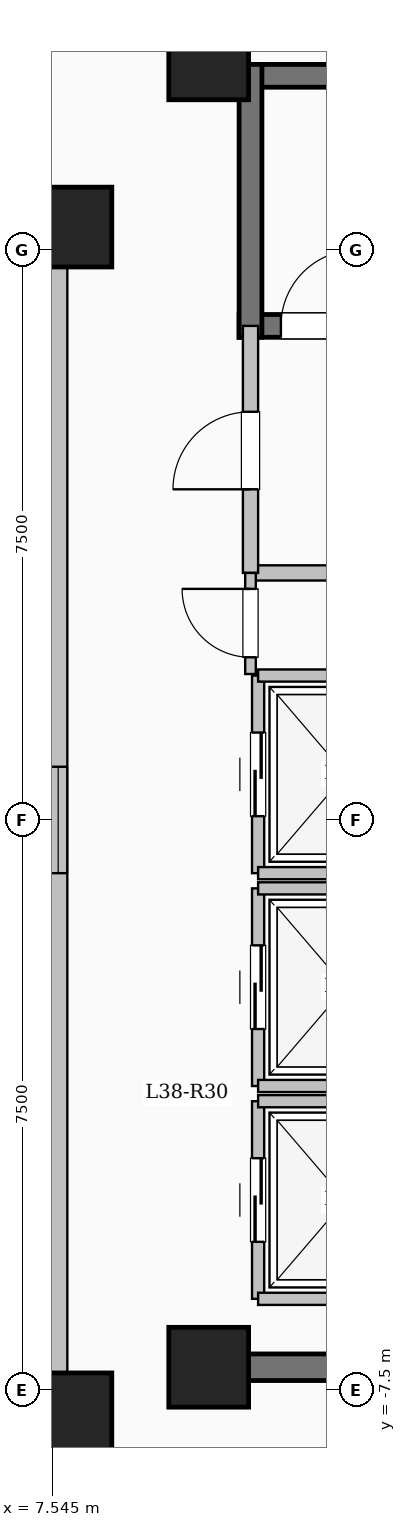
"""IFC4 building model, lengths in metres.
Left out: names, types, materials, properties, quantities, classifications, styles, units other than length and angle.
Written with IfcOpenShell. Run it as: python <this file> out.ifc"""

import sys

from ifc_helpers import new_model, si_unit, direction, frame, frame_2d, origin, origin_2d, place, context, subcontext, project, spatial, rectangle, extrude, element, fill, save


model = new_model("IFC4")
c1 = context("Model", 3, precision=1e-05, world=origin(), true_north=direction((0.0, 1.0)))
c2 = subcontext(c1, "Body", "Model", "MODEL_VIEW")
j1 = project(units=[si_unit("LENGTHUNIT", "METRE"), si_unit("PLANEANGLEUNIT", "RADIAN")], contexts=[c1])
p1 = place(None, origin())
s1 = spatial("IfcSite", under=j1, at=p1, CompositionType="ELEMENT")
p2 = place(p1, origin())
s2 = spatial("IfcBuilding", under=s1, at=p2, CompositionType="ELEMENT")
p3 = place(p2, frame((0.0, 0.0, 142.65)))
s3 = spatial("IfcBuildingStorey", under=s2, at=p3, CompositionType="ELEMENT", Elevation=142.65)
for number, where, z_axis, x_axis in (
    (1, (7.8, -7.8, 0.0), (0.0, 0.0, 1.0), (1.0, 0.0, 0.0)),
    (2, (7.8, 7.8, 0.0), (0.0, 0.0, 1.0), (1.0, 0.0, 0.0)),
    (3, (9.6, -7.2, 0.0), (0.0, 0.0, 1.0), (1.0, 0.0, 0.0)),
    (4, (9.6, 10.0, 0.0), (0.0, 0.0, 1.0), (1.0, 0.0, 0.0)),
):
    element("IfcColumn", number, at=place(p3, frame(where, z_axis=z_axis, x_axis=x_axis)), inside=s3, PredefinedType="COLUMN", context=c2, shape_type="SweptSolid", body=[
        extrude(rectangle(XDim=1.05, YDim=1.05, at=origin_2d()), origin(), (0.0, 0.0, 1.0), 3.35),
    ])
p4 = place(p3, frame((-7.62, -7.62, 0.0), z_axis=(0.0, 0.0, 1.0), x_axis=(1.0, 0.0, 0.0)))
e5 = element("IfcWall", 5, at=p4, inside=s3, PredefinedType="SOLIDWALL", context=c2, shape_type="SweptSolid", body=[
    extrude(rectangle(XDim=15.24, YDim=0.24, at=frame_2d((7.62, 0.0))), origin(), (0.0, 0.0, 1.0), 3.1),
])
p5 = place(p4, frame((6.92, 0.0, 0.95)))
e6 = element("IfcOpeningElement", 6, at=p5, cuts=e5, PredefinedType="OPENING", context=c2, shape_type="SweptSolid", body=[
    extrude(rectangle(XDim=1.4, YDim=1.5, at=frame_2d((0.7, 0.75))), frame((0.0, 0.13, 0.0), z_axis=(0.0, -1.0, 0.0), x_axis=(1.0, 0.0, 0.0)), (0.0, 0.0, 1.0), 0.26),
])
p6 = place(p3, frame((7.62, -7.62, 0.0), z_axis=(0.0, 0.0, 1.0), x_axis=(0.0, 1.0, 0.0)))
e7 = element("IfcWall", 7, at=p6, inside=s3, PredefinedType="SOLIDWALL", context=c2, shape_type="SweptSolid", body=[
    extrude(rectangle(XDim=15.24, YDim=0.24, at=frame_2d((7.62, 0.0))), origin(), (0.0, 0.0, 1.0), 3.1),
])
p7 = place(p6, frame((6.92, 0.0, 0.95)))
e8 = element("IfcOpeningElement", 8, at=p7, cuts=e7, PredefinedType="OPENING", context=c2, shape_type="SweptSolid", body=[
    extrude(rectangle(XDim=1.4, YDim=1.5, at=frame_2d((0.7, 0.75))), frame((0.0, 0.13, 0.0), z_axis=(0.0, -1.0, 0.0), x_axis=(1.0, 0.0, 0.0)), (0.0, 0.0, 1.0), 0.26),
])
p8 = place(p3, frame((7.62, 7.62, 0.0), z_axis=(0.0, 0.0, 1.0), x_axis=(-1.0, 0.0, 0.0)))
e9 = element("IfcWall", 9, at=p8, inside=s3, PredefinedType="SOLIDWALL", context=c2, shape_type="SweptSolid", body=[
    extrude(rectangle(XDim=15.24, YDim=0.24, at=frame_2d((7.62, 0.0))), origin(), (0.0, 0.0, 1.0), 3.1),
])
p9 = place(p8, frame((6.92, 0.0, 0.95)))
e10 = element("IfcOpeningElement", 10, at=p9, cuts=e9, PredefinedType="OPENING", context=c2, shape_type="SweptSolid", body=[
    extrude(rectangle(XDim=1.4, YDim=1.5, at=frame_2d((0.7, 0.75))), frame((0.0, 0.13, 0.0), z_axis=(0.0, -1.0, 0.0), x_axis=(1.0, 0.0, 0.0)), (0.0, 0.0, 1.0), 0.26),
])
p10 = place(p3, frame((10.0, 9.79, 0.0), z_axis=(0.0, 0.0, 1.0), x_axis=(1.0, 0.0, 0.0)))
e11 = element("IfcWall", 11, at=p10, inside=s3, PredefinedType="SHEAR", context=c2, shape_type="SweptSolid", body=[
    extrude(rectangle(XDim=8.0, YDim=0.3, at=frame_2d((4.0, 0.0))), origin(), (0.0, 0.0, 1.0), 3.35),
])
p11 = place(p3, frame((10.0, 6.5, 0.0), z_axis=(0.0, 0.0, 1.0), x_axis=(1.0, 0.0, 0.0)))
e12 = element("IfcWall", 12, at=p11, inside=s3, PredefinedType="SHEAR", context=c2, shape_type="SweptSolid", body=[
    extrude(rectangle(XDim=8.0, YDim=0.3, at=frame_2d((4.0, 0.0))), origin(), (0.0, 0.0, 1.0), 3.35),
])
p12 = place(p11, frame((0.55, 0.0, 0.0)))
e13 = element("IfcOpeningElement", 13, at=p12, cuts=e12, PredefinedType="OPENING", context=c2, shape_type="SweptSolid", body=[
    extrude(rectangle(XDim=1.0, YDim=2.15, at=frame_2d((0.5, 1.075))), frame((0.0, 0.16, 0.0), z_axis=(0.0, -1.0, 0.0), x_axis=(1.0, 0.0, 0.0)), (0.0, 0.0, 1.0), 0.32),
])
p13 = place(p3, frame((10.15, 6.35, 0.0), z_axis=(0.0, 0.0, 1.0), x_axis=(0.0, 1.0, 0.0)))
e14 = element("IfcWall", 14, at=p13, inside=s3, PredefinedType="SHEAR", context=c2, shape_type="SweptSolid", body=[
    extrude(rectangle(XDim=3.59, YDim=0.3, at=frame_2d((1.795, 0.0))), origin(), (0.0, 0.0, 1.0), 3.35),
])
p14 = place(p3, frame((10.15, 3.25, 0.0), z_axis=(0.0, 0.0, 1.0), x_axis=(1.0, 0.0, 0.0)))
e15 = element("IfcWall", 15, at=p14, inside=s3, PredefinedType="SOLIDWALL", context=c2, shape_type="SweptSolid", body=[
    extrude(rectangle(XDim=5.4, YDim=0.2, at=frame_2d((2.7, 0.0))), origin(), (0.0, 0.0, 1.0), 3.1),
])
p15 = place(p3, frame((10.15, 3.25, 0.0), z_axis=(0.0, 0.0, 1.0), x_axis=(0.0, 1.0, 0.0)))
e16 = element("IfcWall", 16, at=p15, inside=s3, PredefinedType="SOLIDWALL", context=c2, shape_type="SweptSolid", body=[
    extrude(rectangle(XDim=3.25, YDim=0.2, at=frame_2d((1.625, 0.0))), origin(), (0.0, 0.0, 1.0), 3.1),
])
p16 = place(p15, frame((1.1, 0.0, 0.0)))
e17 = element("IfcOpeningElement", 17, at=p16, cuts=e16, PredefinedType="OPENING", context=c2, shape_type="SweptSolid", body=[
    extrude(rectangle(XDim=1.02, YDim=2.15, at=frame_2d((0.51, 1.075))), frame((0.0, 0.11, 0.0), z_axis=(0.0, -1.0, 0.0), x_axis=(1.0, 0.0, 0.0)), (0.0, 0.0, 1.0), 0.22),
])
p17 = place(p3, frame((10.25, -6.3, 0.0), z_axis=(0.0, 0.0, 1.0), x_axis=(0.0, 1.0, 0.0)))
e18 = element("IfcWall", 18, at=p17, inside=s3, PredefinedType="SOLIDWALL", context=c2, shape_type="SweptSolid", body=[
    extrude(rectangle(XDim=2.6, YDim=0.16, at=frame_2d((1.3, 0.0))), origin(), (0.0, 0.0, 1.0), 3.1),
])
p18 = place(p17, frame((0.75, 0.0, 0.0)))
e19 = element("IfcOpeningElement", 19, at=p18, cuts=e18, PredefinedType="OPENING", context=c2, shape_type="SweptSolid", body=[
    extrude(rectangle(XDim=1.1, YDim=2.15, at=frame_2d((0.55, 1.075))), frame((0.0, 0.09, 0.0), z_axis=(0.0, -1.0, 0.0), x_axis=(1.0, 0.0, 0.0)), (0.0, 0.0, 1.0), 0.18),
])
for number, where, z_axis, x_axis in (
    (20, (10.25, -6.3, 0.0), (0.0, 0.0, 1.0), (1.0, 0.0, 0.0)),
    (21, (10.25, -3.7, 0.0), (0.0, 0.0, 1.0), (1.0, 0.0, 0.0)),
):
    element("IfcWall", number, at=place(p3, frame(where, z_axis=z_axis, x_axis=x_axis)), inside=s3, PredefinedType="SOLIDWALL", context=c2, shape_type="SweptSolid", body=[
        extrude(rectangle(XDim=2.3, YDim=0.16, at=frame_2d((1.15, 0.0))), origin(), (0.0, 0.0, 1.0), 3.1),
    ])
p19 = place(p3, frame((10.25, -3.5, 0.0), z_axis=(0.0, 0.0, 1.0), x_axis=(0.0, 1.0, 0.0)))
e22 = element("IfcWall", 22, at=p19, inside=s3, PredefinedType="SOLIDWALL", context=c2, shape_type="SweptSolid", body=[
    extrude(rectangle(XDim=2.6, YDim=0.16, at=frame_2d((1.3, 0.0))), origin(), (0.0, 0.0, 1.0), 3.1),
])
p20 = place(p19, frame((0.75, 0.0, 0.0)))
e23 = element("IfcOpeningElement", 23, at=p20, cuts=e22, PredefinedType="OPENING", context=c2, shape_type="SweptSolid", body=[
    extrude(rectangle(XDim=1.1, YDim=2.15, at=frame_2d((0.55, 1.075))), frame((0.0, 0.09, 0.0), z_axis=(0.0, -1.0, 0.0), x_axis=(1.0, 0.0, 0.0)), (0.0, 0.0, 1.0), 0.18),
])
for number, where, z_axis, x_axis in (
    (24, (10.25, -3.5, 0.0), (0.0, 0.0, 1.0), (1.0, 0.0, 0.0)),
    (25, (10.25, -0.9, 0.0), (0.0, 0.0, 1.0), (1.0, 0.0, 0.0)),
):
    element("IfcWall", number, at=place(p3, frame(where, z_axis=z_axis, x_axis=x_axis)), inside=s3, PredefinedType="SOLIDWALL", context=c2, shape_type="SweptSolid", body=[
        extrude(rectangle(XDim=2.3, YDim=0.16, at=frame_2d((1.15, 0.0))), origin(), (0.0, 0.0, 1.0), 3.1),
    ])
p21 = place(p3, frame((10.25, -0.7, 0.0), z_axis=(0.0, 0.0, 1.0), x_axis=(0.0, 1.0, 0.0)))
e26 = element("IfcWall", 26, at=p21, inside=s3, PredefinedType="SOLIDWALL", context=c2, shape_type="SweptSolid", body=[
    extrude(rectangle(XDim=2.6, YDim=0.16, at=frame_2d((1.3, 0.0))), origin(), (0.0, 0.0, 1.0), 3.1),
])
p22 = place(p21, frame((0.75, 0.0, 0.0)))
e27 = element("IfcOpeningElement", 27, at=p22, cuts=e26, PredefinedType="OPENING", context=c2, shape_type="SweptSolid", body=[
    extrude(rectangle(XDim=1.1, YDim=2.15, at=frame_2d((0.55, 1.075))), frame((0.0, 0.09, 0.0), z_axis=(0.0, -1.0, 0.0), x_axis=(1.0, 0.0, 0.0)), (0.0, 0.0, 1.0), 0.18),
])
for number, where, z_axis, x_axis in (
    (28, (10.25, -0.7, 0.0), (0.0, 0.0, 1.0), (1.0, 0.0, 0.0)),
    (29, (10.25, 1.9, 0.0), (0.0, 0.0, 1.0), (1.0, 0.0, 0.0)),
):
    element("IfcWall", number, at=place(p3, frame(where, z_axis=z_axis, x_axis=x_axis)), inside=s3, PredefinedType="SOLIDWALL", context=c2, shape_type="SweptSolid", body=[
        extrude(rectangle(XDim=2.3, YDim=0.16, at=frame_2d((1.15, 0.0))), origin(), (0.0, 0.0, 1.0), 3.1),
    ])
p23 = place(p3, frame((10.075, -7.2, 0.0), z_axis=(0.0, 0.0, 1.0), x_axis=(1.0, 0.0, 0.0)))
e30 = element("IfcWall", 30, at=p23, inside=s3, PredefinedType="SHEAR", context=c2, shape_type="SweptSolid", body=[
    extrude(rectangle(XDim=8.55, YDim=0.35, at=frame_2d((4.275, 0.0))), origin(), (0.0, 0.0, 1.0), 3.35),
])
p24 = place(p3, frame((10.15, 1.92, 0.0), z_axis=(0.0, 0.0, 1.0), x_axis=(0.0, 1.0, 0.0)))
e31 = element("IfcWall", 31, at=p24, inside=s3, PredefinedType="PARTITIONING", context=c2, shape_type="SweptSolid", body=[
    extrude(rectangle(XDim=1.33, YDim=0.14, at=frame_2d((0.665, 0.0))), origin(), (0.0, 0.0, 1.0), 3.1),
])
p25 = place(p24, frame((0.22, 0.0, 0.0)))
e32 = element("IfcOpeningElement", 32, at=p25, cuts=e31, PredefinedType="OPENING", context=c2, shape_type="SweptSolid", body=[
    extrude(rectangle(XDim=0.9, YDim=2.08, at=frame_2d((0.45, 1.04))), frame((0.0, 0.08, 0.0), z_axis=(0.0, -1.0, 0.0), x_axis=(1.0, 0.0, 0.0)), (0.0, 0.0, 1.0), 0.16),
])
p26 = place(p7, origin())
e33 = element("IfcWindow", 33, at=p26, inside=s3, PartitioningType="SINGLE_PANEL", PredefinedType="WINDOW", context=c2, shape_type="SweptSolid", body=[
    extrude(rectangle(XDim=1.4, YDim=1.5, at=frame_2d((0.7, 0.75))), frame((0.0, 0.03, 0.0), z_axis=(0.0, -1.0, 0.0), x_axis=(1.0, 0.0, 0.0)), (0.0, 0.0, 1.0), 0.06),
])
fill(e8, e33)
p27 = place(p12, origin())
e34 = element("IfcDoor", 34, at=p27, inside=s3, OperationType="SINGLE_SWING_RIGHT", PredefinedType="DOOR", context=c2, shape_type="SweptSolid", body=[
    extrude(rectangle(XDim=1.0, YDim=2.15, at=frame_2d((0.5, 1.075))), frame((0.0, 0.025, 0.0), z_axis=(0.0, -1.0, 0.0), x_axis=(1.0, 0.0, 0.0)), (0.0, 0.0, 1.0), 0.05),
])
fill(e13, e34)
p28 = place(p16, origin())
e35 = element("IfcDoor", 35, at=p28, inside=s3, OperationType="SINGLE_SWING_LEFT", PredefinedType="DOOR", context=c2, shape_type="SweptSolid", body=[
    extrude(rectangle(XDim=1.02, YDim=2.15, at=frame_2d((0.51, 1.075))), frame((0.0, 0.025, 0.0), z_axis=(0.0, -1.0, 0.0), x_axis=(1.0, 0.0, 0.0)), (0.0, 0.0, 1.0), 0.05),
])
fill(e17, e35)
p29 = place(p18, origin())
e36 = element("IfcDoor", 36, at=p29, inside=s3, OperationType="SLIDING_TO_LEFT", PredefinedType="DOOR", context=c2, shape_type="SweptSolid", body=[
    extrude(rectangle(XDim=1.1, YDim=2.15, at=frame_2d((0.55, 1.075))), frame((0.0, 0.025, 0.0), z_axis=(0.0, -1.0, 0.0), x_axis=(1.0, 0.0, 0.0)), (0.0, 0.0, 1.0), 0.05),
])
fill(e19, e36)
p30 = place(p20, origin())
e37 = element("IfcDoor", 37, at=p30, inside=s3, OperationType="SLIDING_TO_LEFT", PredefinedType="DOOR", context=c2, shape_type="SweptSolid", body=[
    extrude(rectangle(XDim=1.1, YDim=2.15, at=frame_2d((0.55, 1.075))), frame((0.0, 0.025, 0.0), z_axis=(0.0, -1.0, 0.0), x_axis=(1.0, 0.0, 0.0)), (0.0, 0.0, 1.0), 0.05),
])
fill(e23, e37)
p31 = place(p22, origin())
e38 = element("IfcDoor", 38, at=p31, inside=s3, OperationType="SLIDING_TO_LEFT", PredefinedType="DOOR", context=c2, shape_type="SweptSolid", body=[
    extrude(rectangle(XDim=1.1, YDim=2.15, at=frame_2d((0.55, 1.075))), frame((0.0, 0.025, 0.0), z_axis=(0.0, -1.0, 0.0), x_axis=(1.0, 0.0, 0.0)), (0.0, 0.0, 1.0), 0.05),
])
fill(e27, e38)
p32 = place(p25, origin())
e39 = element("IfcDoor", 39, at=p32, inside=s3, OperationType="SINGLE_SWING_RIGHT", PredefinedType="DOOR", context=c2, shape_type="SweptSolid", body=[
    extrude(rectangle(XDim=0.9, YDim=2.08, at=frame_2d((0.45, 1.04))), frame((0.0, 0.025, 0.0), z_axis=(0.0, -1.0, 0.0), x_axis=(1.0, 0.0, 0.0)), (0.0, 0.0, 1.0), 0.05),
])
fill(e32, e39)
save(model, sys.argv[1])
